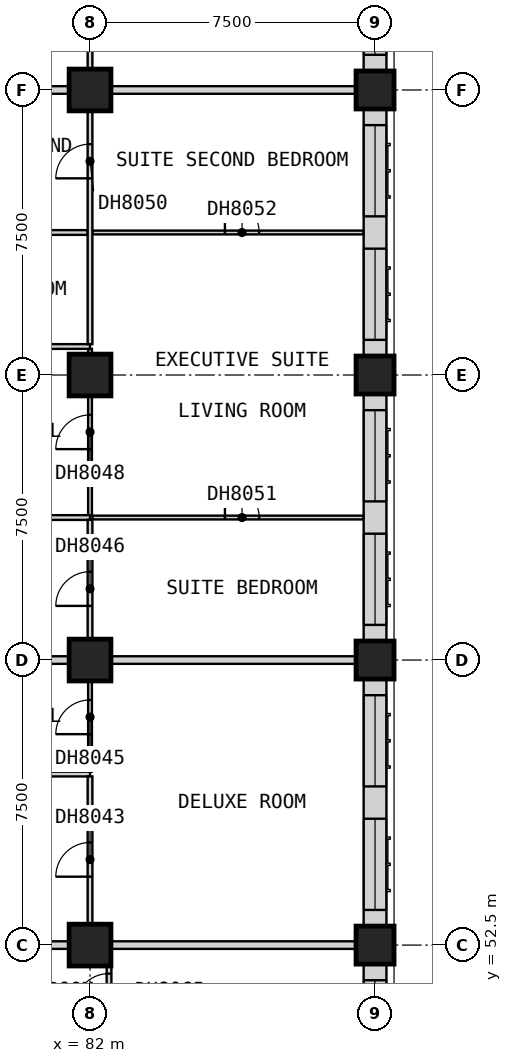
"""IFC4 building model, lengths in metres.
Left out: names, types, materials, properties, quantities, classifications, styles, units other than length and angle.
Written with IfcOpenShell. Run it as: python <this file> out.ifc"""

import sys

from ifc_helpers import new_model, si_unit, direction, frame, frame_2d, origin, origin_2d, place, context, subcontext, project, spatial, rectangle, extrude, element, fill, save


model = new_model("IFC4")
c1 = context("Model", 3, precision=1e-05, world=origin(), true_north=direction((0.0, 1.0)))
c2 = subcontext(c1, "Body", "Model", "MODEL_VIEW")
j1 = project(units=[si_unit("LENGTHUNIT", "METRE"), si_unit("PLANEANGLEUNIT", "RADIAN")], contexts=[c1])
p1 = place(None, origin())
s1 = spatial("IfcSite", under=j1, at=p1, CompositionType="ELEMENT")
p2 = place(p1, origin())
s2 = spatial("IfcBuilding", under=s1, at=p2, CompositionType="ELEMENT")
p3 = place(p2, frame((0.0, 0.0, 89.9)))
s3 = spatial("IfcBuildingStorey", under=s2, at=p3, CompositionType="ELEMENT", Elevation=89.9)
for number, where, z_axis, x_axis in (
    (1, (82.0, 52.5, 0.0), (0.0, 0.0, 1.0), (1.0, 0.0, 0.0)),
    (2, (82.0, 60.0, 0.0), (0.0, 0.0, 1.0), (1.0, 0.0, 0.0)),
    (3, (82.0, 67.5, 0.0), (0.0, 0.0, 1.0), (1.0, 0.0, 0.0)),
    (4, (82.0, 75.0, 0.0), (0.0, 0.0, 1.0), (1.0, 0.0, 0.0)),
):
    element("IfcColumn", number, at=place(p3, frame(where, z_axis=z_axis, x_axis=x_axis)), inside=s3, PredefinedType="COLUMN", context=c2, shape_type="SweptSolid", body=[
        extrude(rectangle(XDim=1.1, YDim=1.1, at=origin_2d()), origin(), (0.0, 0.0, 1.0), 3.6),
    ])
for number, where, z_axis, x_axis in (
    (5, (89.5, 52.5, 0.0), (0.0, 0.0, 1.0), (1.0, 0.0, 0.0)),
    (6, (89.5, 60.0, 0.0), (0.0, 0.0, 1.0), (1.0, 0.0, 0.0)),
    (7, (89.5, 67.5, 0.0), (0.0, 0.0, 1.0), (1.0, 0.0, 0.0)),
    (8, (89.5, 75.0, 0.0), (0.0, 0.0, 1.0), (1.0, 0.0, 0.0)),
):
    element("IfcColumn", number, at=place(p3, frame(where, z_axis=z_axis, x_axis=x_axis)), inside=s3, PredefinedType="COLUMN", context=c2, shape_type="SweptSolid", body=[
        extrude(rectangle(XDim=1.0, YDim=1.0, at=origin_2d()), origin(), (0.0, 0.0, 1.0), 3.6),
    ])
p4 = place(p3, frame((89.5, 46.0, 0.0), z_axis=(0.0, 0.0, 1.0), x_axis=(0.0, 1.0, 0.0)))
e9 = element("IfcWall", 9, at=p4, inside=s3, PredefinedType="SOLIDWALL", context=c2, shape_type="SweptSolid", body=[
    extrude(rectangle(XDim=6.0, YDim=0.6, at=frame_2d((3.0, 0.0))), origin(), (0.0, 0.0, 1.0), 2.85),
])
p5 = place(p4, frame((0.175, 0.0, 0.8)))
e10 = element("IfcOpeningElement", 10, at=p5, cuts=e9, PredefinedType="OPENING", context=c2, shape_type="SweptSolid", body=[
    extrude(rectangle(XDim=2.4, YDim=1.8, at=frame_2d((1.2, 0.9))), frame((0.0, 0.31, 0.0), z_axis=(0.0, -1.0, 0.0), x_axis=(1.0, 0.0, 0.0)), (0.0, 0.0, 1.0), 0.62),
])
p6 = place(p4, frame((3.175, 0.0, 0.8)))
e11 = element("IfcOpeningElement", 11, at=p6, cuts=e9, PredefinedType="OPENING", context=c2, shape_type="SweptSolid", body=[
    extrude(rectangle(XDim=2.4, YDim=1.8, at=frame_2d((1.2, 0.9))), frame((0.0, 0.31, 0.0), z_axis=(0.0, -1.0, 0.0), x_axis=(1.0, 0.0, 0.0)), (0.0, 0.0, 1.0), 0.62),
])
p7 = place(p3, frame((89.5, 53.0, 0.0), z_axis=(0.0, 0.0, 1.0), x_axis=(0.0, 1.0, 0.0)))
e12 = element("IfcWall", 12, at=p7, inside=s3, PredefinedType="SOLIDWALL", context=c2, shape_type="SweptSolid", body=[
    extrude(rectangle(XDim=6.5, YDim=0.6, at=frame_2d((3.25, 0.0))), origin(), (0.0, 0.0, 1.0), 2.85),
])
p8 = place(p7, frame((0.425, 0.0, 0.8)))
e13 = element("IfcOpeningElement", 13, at=p8, cuts=e12, PredefinedType="OPENING", context=c2, shape_type="SweptSolid", body=[
    extrude(rectangle(XDim=2.4, YDim=1.8, at=frame_2d((1.2, 0.9))), frame((0.0, 0.31, 0.0), z_axis=(0.0, -1.0, 0.0), x_axis=(1.0, 0.0, 0.0)), (0.0, 0.0, 1.0), 0.62),
])
p9 = place(p7, frame((3.675, 0.0, 0.8)))
e14 = element("IfcOpeningElement", 14, at=p9, cuts=e12, PredefinedType="OPENING", context=c2, shape_type="SweptSolid", body=[
    extrude(rectangle(XDim=2.4, YDim=1.8, at=frame_2d((1.2, 0.9))), frame((0.0, 0.31, 0.0), z_axis=(0.0, -1.0, 0.0), x_axis=(1.0, 0.0, 0.0)), (0.0, 0.0, 1.0), 0.62),
])
p10 = place(p3, frame((89.5, 60.5, 0.0), z_axis=(0.0, 0.0, 1.0), x_axis=(0.0, 1.0, 0.0)))
e15 = element("IfcWall", 15, at=p10, inside=s3, PredefinedType="SOLIDWALL", context=c2, shape_type="SweptSolid", body=[
    extrude(rectangle(XDim=6.5, YDim=0.6, at=frame_2d((3.25, 0.0))), origin(), (0.0, 0.0, 1.0), 2.85),
])
p11 = place(p10, frame((0.425, 0.0, 0.8)))
e16 = element("IfcOpeningElement", 16, at=p11, cuts=e15, PredefinedType="OPENING", context=c2, shape_type="SweptSolid", body=[
    extrude(rectangle(XDim=2.4, YDim=1.8, at=frame_2d((1.2, 0.9))), frame((0.0, 0.31, 0.0), z_axis=(0.0, -1.0, 0.0), x_axis=(1.0, 0.0, 0.0)), (0.0, 0.0, 1.0), 0.62),
])
p12 = place(p10, frame((3.675, 0.0, 0.8)))
e17 = element("IfcOpeningElement", 17, at=p12, cuts=e15, PredefinedType="OPENING", context=c2, shape_type="SweptSolid", body=[
    extrude(rectangle(XDim=2.4, YDim=1.8, at=frame_2d((1.2, 0.9))), frame((0.0, 0.31, 0.0), z_axis=(0.0, -1.0, 0.0), x_axis=(1.0, 0.0, 0.0)), (0.0, 0.0, 1.0), 0.62),
])
p13 = place(p3, frame((89.5, 68.0, 0.0), z_axis=(0.0, 0.0, 1.0), x_axis=(0.0, 1.0, 0.0)))
e18 = element("IfcWall", 18, at=p13, inside=s3, PredefinedType="SOLIDWALL", context=c2, shape_type="SweptSolid", body=[
    extrude(rectangle(XDim=6.5, YDim=0.6, at=frame_2d((3.25, 0.0))), origin(), (0.0, 0.0, 1.0), 2.85),
])
p14 = place(p13, frame((0.425, 0.0, 0.8)))
e19 = element("IfcOpeningElement", 19, at=p14, cuts=e18, PredefinedType="OPENING", context=c2, shape_type="SweptSolid", body=[
    extrude(rectangle(XDim=2.4, YDim=1.8, at=frame_2d((1.2, 0.9))), frame((0.0, 0.31, 0.0), z_axis=(0.0, -1.0, 0.0), x_axis=(1.0, 0.0, 0.0)), (0.0, 0.0, 1.0), 0.62),
])
p15 = place(p13, frame((3.675, 0.0, 0.8)))
e20 = element("IfcOpeningElement", 20, at=p15, cuts=e18, PredefinedType="OPENING", context=c2, shape_type="SweptSolid", body=[
    extrude(rectangle(XDim=2.4, YDim=1.8, at=frame_2d((1.2, 0.9))), frame((0.0, 0.31, 0.0), z_axis=(0.0, -1.0, 0.0), x_axis=(1.0, 0.0, 0.0)), (0.0, 0.0, 1.0), 0.62),
])
p16 = place(p3, frame((89.5, 75.5, 0.0), z_axis=(0.0, 0.0, 1.0), x_axis=(0.0, 1.0, 0.0)))
e21 = element("IfcWall", 21, at=p16, inside=s3, PredefinedType="SOLIDWALL", context=c2, shape_type="SweptSolid", body=[
    extrude(rectangle(XDim=6.5, YDim=0.6, at=frame_2d((3.25, 0.0))), origin(), (0.0, 0.0, 1.0), 2.85),
])
p17 = place(p16, frame((0.425, 0.0, 0.8)))
e22 = element("IfcOpeningElement", 22, at=p17, cuts=e21, PredefinedType="OPENING", context=c2, shape_type="SweptSolid", body=[
    extrude(rectangle(XDim=2.4, YDim=1.8, at=frame_2d((1.2, 0.9))), frame((0.0, 0.31, 0.0), z_axis=(0.0, -1.0, 0.0), x_axis=(1.0, 0.0, 0.0)), (0.0, 0.0, 1.0), 0.62),
])
p18 = place(p16, frame((3.675, 0.0, 0.8)))
e23 = element("IfcOpeningElement", 23, at=p18, cuts=e21, PredefinedType="OPENING", context=c2, shape_type="SweptSolid", body=[
    extrude(rectangle(XDim=2.4, YDim=1.8, at=frame_2d((1.2, 0.9))), frame((0.0, 0.31, 0.0), z_axis=(0.0, -1.0, 0.0), x_axis=(1.0, 0.0, 0.0)), (0.0, 0.0, 1.0), 0.62),
])
for number, where, z_axis, x_axis in (
    (24, (77.475, 52.5, 0.0), (0.0, 0.0, 1.0), (1.0, 0.0, 0.0)),
    (25, (77.475, 60.0, 0.0), (0.0, 0.0, 1.0), (1.0, 0.0, 0.0)),
    (26, (77.475, 75.0, 0.0), (0.0, 0.0, 1.0), (1.0, 0.0, 0.0)),
):
    element("IfcWall", number, at=place(p3, frame(where, z_axis=z_axis, x_axis=x_axis)), inside=s3, PredefinedType="PARTITIONING", context=c2, shape_type="SweptSolid", body=[
        extrude(rectangle(XDim=12.525, YDim=0.2, at=frame_2d((6.262, 0.0))), origin(), (0.0, 0.0, 1.0), 3.35),
    ])
p19 = place(p3, frame((82.062, 63.75, 0.0), z_axis=(0.0, 0.0, 1.0), x_axis=(1.0, 0.0, 0.0)))
e27 = element("IfcWall", 27, at=p19, inside=s3, PredefinedType="PARTITIONING", context=c2, shape_type="SweptSolid", body=[
    extrude(rectangle(XDim=7.127, YDim=0.1, at=frame_2d((3.564, 0.0))), origin(), (0.0, 0.0, 1.0), 3.35),
])
p20 = place(p19, frame((3.488, 0.0, 0.0)))
e28 = element("IfcOpeningElement", 28, at=p20, cuts=e27, PredefinedType="OPENING", context=c2, shape_type="SweptSolid", body=[
    extrude(rectangle(XDim=0.9, YDim=2.1, at=frame_2d((0.45, 1.05))), frame((0.0, 0.06, 0.0), z_axis=(0.0, -1.0, 0.0), x_axis=(1.0, 0.0, 0.0)), (0.0, 0.0, 1.0), 0.12),
])
p21 = place(p3, frame((82.062, 71.25, 0.0), z_axis=(0.0, 0.0, 1.0), x_axis=(1.0, 0.0, 0.0)))
e29 = element("IfcWall", 29, at=p21, inside=s3, PredefinedType="PARTITIONING", context=c2, shape_type="SweptSolid", body=[
    extrude(rectangle(XDim=7.127, YDim=0.1, at=frame_2d((3.564, 0.0))), origin(), (0.0, 0.0, 1.0), 3.35),
])
p22 = place(p21, frame((3.488, 0.0, 0.0)))
e30 = element("IfcOpeningElement", 30, at=p22, cuts=e29, PredefinedType="OPENING", context=c2, shape_type="SweptSolid", body=[
    extrude(rectangle(XDim=0.9, YDim=2.1, at=frame_2d((0.45, 1.05))), frame((0.0, 0.06, 0.0), z_axis=(0.0, -1.0, 0.0), x_axis=(1.0, 0.0, 0.0)), (0.0, 0.0, 1.0), 0.12),
])
p23 = place(p3, frame((82.0, 57.062, 0.0), z_axis=(0.0, 0.0, 1.0), x_axis=(0.0, 1.0, 0.0)))
e31 = element("IfcWall", 31, at=p23, inside=s3, PredefinedType="PARTITIONING", context=c2, shape_type="SweptSolid", body=[
    extrude(rectangle(XDim=2.837, YDim=0.1, at=frame_2d((1.419, 0.0))), origin(), (0.0, 0.0, 1.0), 3.35),
])
p24 = place(p23, frame((0.988, 0.0, 0.0)))
e32 = element("IfcOpeningElement", 32, at=p24, cuts=e31, PredefinedType="OPENING", context=c2, shape_type="SweptSolid", body=[
    extrude(rectangle(XDim=0.9, YDim=2.1, at=frame_2d((0.45, 1.05))), frame((0.0, 0.06, 0.0), z_axis=(0.0, -1.0, 0.0), x_axis=(1.0, 0.0, 0.0)), (0.0, 0.0, 1.0), 0.12),
])
p25 = place(p3, frame((82.0, 63.812, 0.0), z_axis=(0.0, 0.0, 1.0), x_axis=(0.0, 1.0, 0.0)))
e33 = element("IfcWall", 33, at=p25, inside=s3, PredefinedType="PARTITIONING", context=c2, shape_type="SweptSolid", body=[
    extrude(rectangle(XDim=4.375, YDim=0.1, at=frame_2d((2.188, 0.0))), origin(), (0.0, 0.0, 1.0), 3.35),
])
p26 = place(p25, frame((1.738, 0.0, 0.0)))
e34 = element("IfcOpeningElement", 34, at=p26, cuts=e33, PredefinedType="OPENING", context=c2, shape_type="SweptSolid", body=[
    extrude(rectangle(XDim=0.9, YDim=2.1, at=frame_2d((0.45, 1.05))), frame((0.0, 0.06, 0.0), z_axis=(0.0, -1.0, 0.0), x_axis=(1.0, 0.0, 0.0)), (0.0, 0.0, 1.0), 0.12),
])
for number, where, z_axis, x_axis in (
    (35, (77.475, 57.0, 0.0), (0.0, 0.0, 1.0), (1.0, 0.0, 0.0)),
    (36, (77.475, 63.75, 0.0), (0.0, 0.0, 1.0), (1.0, 0.0, 0.0)),
):
    element("IfcWall", number, at=place(p3, frame(where, z_axis=z_axis, x_axis=x_axis)), inside=s3, PredefinedType="PARTITIONING", context=c2, shape_type="SweptSolid", body=[
        extrude(rectangle(XDim=4.525, YDim=0.125, at=frame_2d((2.262, 0.0))), origin(), (0.0, 0.0, 1.0), 3.35),
    ])
p27 = place(p3, frame((77.475, 68.25, 0.0), z_axis=(0.0, 0.0, 1.0), x_axis=(1.0, 0.0, 0.0)))
e37 = element("IfcWall", 37, at=p27, inside=s3, PredefinedType="PARTITIONING", context=c2, shape_type="SweptSolid", body=[
    extrude(rectangle(XDim=4.525, YDim=0.125, at=frame_2d((2.262, 0.0))), origin(), (0.0, 0.0, 1.0), 3.35),
])
p28 = place(p27, frame((1.775, 0.0, 0.0)))
e38 = element("IfcOpeningElement", 38, at=p28, cuts=e37, PredefinedType="OPENING", context=c2, shape_type="SweptSolid", body=[
    extrude(rectangle(XDim=0.9, YDim=2.1, at=frame_2d((0.45, 1.05))), frame((0.0, 0.073, 0.0), z_axis=(0.0, -1.0, 0.0), x_axis=(1.0, 0.0, 0.0)), (0.0, 0.0, 1.0), 0.145),
])
p29 = place(p3, frame((77.475, 71.25, 0.0), z_axis=(0.0, 0.0, 1.0), x_axis=(1.0, 0.0, 0.0)))
e39 = element("IfcWall", 39, at=p29, inside=s3, PredefinedType="PARTITIONING", context=c2, shape_type="SweptSolid", body=[
    extrude(rectangle(XDim=4.462, YDim=0.125, at=frame_2d((2.231, 0.0))), origin(), (0.0, 0.0, 1.0), 3.35),
])
p30 = place(p3, frame((82.0, 52.6, 0.0), z_axis=(0.0, 0.0, 1.0), x_axis=(0.0, 1.0, 0.0)))
e40 = element("IfcWall", 40, at=p30, inside=s3, PredefinedType="PARTITIONING", context=c2, shape_type="SweptSolid", body=[
    extrude(rectangle(XDim=4.337, YDim=0.125, at=frame_2d((2.169, 0.0))), origin(), (0.0, 0.0, 1.0), 3.35),
])
p31 = place(p30, frame((1.7, 0.0, 0.0)))
e41 = element("IfcOpeningElement", 41, at=p31, cuts=e40, PredefinedType="OPENING", context=c2, shape_type="SweptSolid", body=[
    extrude(rectangle(XDim=0.9, YDim=2.1, at=frame_2d((0.45, 1.05))), frame((0.0, 0.073, 0.0), z_axis=(0.0, -1.0, 0.0), x_axis=(1.0, 0.0, 0.0)), (0.0, 0.0, 1.0), 0.145),
])
p32 = place(p3, frame((82.0, 60.1, 0.0), z_axis=(0.0, 0.0, 1.0), x_axis=(0.0, 1.0, 0.0)))
e42 = element("IfcWall", 42, at=p32, inside=s3, PredefinedType="PARTITIONING", context=c2, shape_type="SweptSolid", body=[
    extrude(rectangle(XDim=3.587, YDim=0.125, at=frame_2d((1.794, 0.0))), origin(), (0.0, 0.0, 1.0), 3.35),
])
p33 = place(p32, frame((1.325, 0.0, 0.0)))
e43 = element("IfcOpeningElement", 43, at=p33, cuts=e42, PredefinedType="OPENING", context=c2, shape_type="SweptSolid", body=[
    extrude(rectangle(XDim=0.9, YDim=2.1, at=frame_2d((0.45, 1.05))), frame((0.0, 0.073, 0.0), z_axis=(0.0, -1.0, 0.0), x_axis=(1.0, 0.0, 0.0)), (0.0, 0.0, 1.0), 0.145),
])
p34 = place(p3, frame((82.0, 68.312, 0.0), z_axis=(0.0, 0.0, 1.0), x_axis=(0.0, 1.0, 0.0)))
e44 = element("IfcWall", 44, at=p34, inside=s3, PredefinedType="PARTITIONING", context=c2, shape_type="SweptSolid", body=[
    extrude(rectangle(XDim=10.375, YDim=0.125, at=frame_2d((5.188, 0.0))), origin(), (0.0, 0.0, 1.0), 3.35),
])
p35 = place(p34, frame((4.363, 0.0, 0.0)))
e45 = element("IfcOpeningElement", 45, at=p35, cuts=e44, PredefinedType="OPENING", context=c2, shape_type="SweptSolid", body=[
    extrude(rectangle(XDim=0.9, YDim=2.1, at=frame_2d((0.45, 1.05))), frame((0.0, 0.073, 0.0), z_axis=(0.0, -1.0, 0.0), x_axis=(1.0, 0.0, 0.0)), (0.0, 0.0, 1.0), 0.145),
])
p36 = place(p34, frame((8.113, 0.0, 0.0)))
e46 = element("IfcOpeningElement", 46, at=p36, cuts=e44, PredefinedType="OPENING", context=c2, shape_type="SweptSolid", body=[
    extrude(rectangle(XDim=0.9, YDim=2.1, at=frame_2d((0.45, 1.05))), frame((0.0, 0.073, 0.0), z_axis=(0.0, -1.0, 0.0), x_axis=(1.0, 0.0, 0.0)), (0.0, 0.0, 1.0), 0.145),
])
p37 = place(p3, frame((82.5, 50.163, 0.0), z_axis=(0.0, 0.0, 1.0), x_axis=(0.0, 1.0, 0.0)))
e47 = element("IfcWall", 47, at=p37, inside=s3, PredefinedType="PARTITIONING", context=c2, shape_type="SweptSolid", body=[
    extrude(rectangle(XDim=2.237, YDim=0.125, at=frame_2d((1.119, 0.0))), origin(), (0.0, 0.0, 1.0), 3.35),
])
p38 = place(p37, frame((0.688, 0.0, 0.0)))
e48 = element("IfcOpeningElement", 48, at=p38, cuts=e47, PredefinedType="OPENING", context=c2, shape_type="SweptSolid", body=[
    extrude(rectangle(XDim=0.9, YDim=2.1, at=frame_2d((0.45, 1.05))), frame((0.0, 0.073, 0.0), z_axis=(0.0, -1.0, 0.0), x_axis=(1.0, 0.0, 0.0)), (0.0, 0.0, 1.0), 0.145),
])
p39 = place(p6, origin())
e49 = element("IfcWindow", 49, at=p39, inside=s3, PartitioningType="SINGLE_PANEL", PredefinedType="WINDOW", context=c2, shape_type="SweptSolid", body=[
    extrude(rectangle(XDim=2.4, YDim=1.8, at=frame_2d((1.2, 0.9))), frame((0.0, -0.07, 0.0), z_axis=(0.0, -1.0, 0.0), x_axis=(1.0, 0.0, 0.0)), (0.0, 0.0, 1.0), 0.06),
])
fill(e11, e49)
p40 = place(p8, origin())
e50 = element("IfcWindow", 50, at=p40, inside=s3, PartitioningType="SINGLE_PANEL", PredefinedType="WINDOW", context=c2, shape_type="SweptSolid", body=[
    extrude(rectangle(XDim=2.4, YDim=1.8, at=frame_2d((1.2, 0.9))), frame((0.0, -0.07, 0.0), z_axis=(0.0, -1.0, 0.0), x_axis=(1.0, 0.0, 0.0)), (0.0, 0.0, 1.0), 0.06),
])
fill(e13, e50)
p41 = place(p9, origin())
e51 = element("IfcWindow", 51, at=p41, inside=s3, PartitioningType="SINGLE_PANEL", PredefinedType="WINDOW", context=c2, shape_type="SweptSolid", body=[
    extrude(rectangle(XDim=2.4, YDim=1.8, at=frame_2d((1.2, 0.9))), frame((0.0, -0.07, 0.0), z_axis=(0.0, -1.0, 0.0), x_axis=(1.0, 0.0, 0.0)), (0.0, 0.0, 1.0), 0.06),
])
fill(e14, e51)
p42 = place(p11, origin())
e52 = element("IfcWindow", 52, at=p42, inside=s3, PartitioningType="SINGLE_PANEL", PredefinedType="WINDOW", context=c2, shape_type="SweptSolid", body=[
    extrude(rectangle(XDim=2.4, YDim=1.8, at=frame_2d((1.2, 0.9))), frame((0.0, -0.07, 0.0), z_axis=(0.0, -1.0, 0.0), x_axis=(1.0, 0.0, 0.0)), (0.0, 0.0, 1.0), 0.06),
])
fill(e16, e52)
p43 = place(p12, origin())
e53 = element("IfcWindow", 53, at=p43, inside=s3, PartitioningType="SINGLE_PANEL", PredefinedType="WINDOW", context=c2, shape_type="SweptSolid", body=[
    extrude(rectangle(XDim=2.4, YDim=1.8, at=frame_2d((1.2, 0.9))), frame((0.0, -0.07, 0.0), z_axis=(0.0, -1.0, 0.0), x_axis=(1.0, 0.0, 0.0)), (0.0, 0.0, 1.0), 0.06),
])
fill(e17, e53)
p44 = place(p14, origin())
e54 = element("IfcWindow", 54, at=p44, inside=s3, PartitioningType="SINGLE_PANEL", PredefinedType="WINDOW", context=c2, shape_type="SweptSolid", body=[
    extrude(rectangle(XDim=2.4, YDim=1.8, at=frame_2d((1.2, 0.9))), frame((0.0, -0.07, 0.0), z_axis=(0.0, -1.0, 0.0), x_axis=(1.0, 0.0, 0.0)), (0.0, 0.0, 1.0), 0.06),
])
fill(e19, e54)
p45 = place(p15, origin())
e55 = element("IfcWindow", 55, at=p45, inside=s3, PartitioningType="SINGLE_PANEL", PredefinedType="WINDOW", context=c2, shape_type="SweptSolid", body=[
    extrude(rectangle(XDim=2.4, YDim=1.8, at=frame_2d((1.2, 0.9))), frame((0.0, -0.07, 0.0), z_axis=(0.0, -1.0, 0.0), x_axis=(1.0, 0.0, 0.0)), (0.0, 0.0, 1.0), 0.06),
])
fill(e20, e55)
p46 = place(p17, origin())
e56 = element("IfcWindow", 56, at=p46, inside=s3, PartitioningType="SINGLE_PANEL", PredefinedType="WINDOW", context=c2, shape_type="SweptSolid", body=[
    extrude(rectangle(XDim=2.4, YDim=1.8, at=frame_2d((1.2, 0.9))), frame((0.0, -0.07, 0.0), z_axis=(0.0, -1.0, 0.0), x_axis=(1.0, 0.0, 0.0)), (0.0, 0.0, 1.0), 0.06),
])
fill(e22, e56)
p47 = place(p31, origin())
e57 = element("IfcDoor", 57, at=p47, inside=s3, OperationType="SINGLE_SWING_LEFT", PredefinedType="DOOR", context=c2, shape_type="SweptSolid", body=[
    extrude(rectangle(XDim=0.9, YDim=2.1, at=frame_2d((0.45, 1.05))), frame((0.0, 0.025, 0.0), z_axis=(0.0, -1.0, 0.0), x_axis=(1.0, 0.0, 0.0)), (0.0, 0.0, 1.0), 0.05),
])
fill(e41, e57)
p48 = place(p24, origin())
e58 = element("IfcDoor", 58, at=p48, inside=s3, OperationType="SINGLE_SWING_LEFT", PredefinedType="DOOR", context=c2, shape_type="SweptSolid", body=[
    extrude(rectangle(XDim=0.9, YDim=2.1, at=frame_2d((0.45, 1.05))), frame((0.0, 0.025, 0.0), z_axis=(0.0, -1.0, 0.0), x_axis=(1.0, 0.0, 0.0)), (0.0, 0.0, 1.0), 0.05),
])
fill(e32, e58)
p49 = place(p33, origin())
e59 = element("IfcDoor", 59, at=p49, inside=s3, OperationType="SINGLE_SWING_LEFT", PredefinedType="DOOR", context=c2, shape_type="SweptSolid", body=[
    extrude(rectangle(XDim=0.9, YDim=2.1, at=frame_2d((0.45, 1.05))), frame((0.0, 0.025, 0.0), z_axis=(0.0, -1.0, 0.0), x_axis=(1.0, 0.0, 0.0)), (0.0, 0.0, 1.0), 0.05),
])
fill(e43, e59)
p50 = place(p26, origin())
e60 = element("IfcDoor", 60, at=p50, inside=s3, OperationType="SINGLE_SWING_LEFT", PredefinedType="DOOR", context=c2, shape_type="SweptSolid", body=[
    extrude(rectangle(XDim=0.9, YDim=2.1, at=frame_2d((0.45, 1.05))), frame((0.0, 0.025, 0.0), z_axis=(0.0, -1.0, 0.0), x_axis=(1.0, 0.0, 0.0)), (0.0, 0.0, 1.0), 0.05),
])
fill(e34, e60)
p51 = place(p35, origin())
e61 = element("IfcDoor", 61, at=p51, inside=s3, OperationType="SINGLE_SWING_LEFT", PredefinedType="DOOR", context=c2, shape_type="SweptSolid", body=[
    extrude(rectangle(XDim=0.9, YDim=2.1, at=frame_2d((0.45, 1.05))), frame((0.0, 0.025, 0.0), z_axis=(0.0, -1.0, 0.0), x_axis=(1.0, 0.0, 0.0)), (0.0, 0.0, 1.0), 0.05),
])
fill(e45, e61)
p52 = place(p20, origin())
e62 = element("IfcDoor", 62, at=p52, inside=s3, OperationType="SINGLE_SWING_RIGHT", PredefinedType="DOOR", context=c2, shape_type="SweptSolid", body=[
    extrude(rectangle(XDim=0.9, YDim=2.1, at=frame_2d((0.45, 1.05))), frame((0.0, 0.025, 0.0), z_axis=(0.0, -1.0, 0.0), x_axis=(1.0, 0.0, 0.0)), (0.0, 0.0, 1.0), 0.05),
])
fill(e28, e62)
p53 = place(p22, origin())
e63 = element("IfcDoor", 63, at=p53, inside=s3, OperationType="SINGLE_SWING_RIGHT", PredefinedType="DOOR", context=c2, shape_type="SweptSolid", body=[
    extrude(rectangle(XDim=0.9, YDim=2.1, at=frame_2d((0.45, 1.05))), frame((0.0, 0.025, 0.0), z_axis=(0.0, -1.0, 0.0), x_axis=(1.0, 0.0, 0.0)), (0.0, 0.0, 1.0), 0.05),
])
fill(e30, e63)
p54 = place(p38, origin())
e64 = element("IfcDoor", 64, at=p54, inside=s3, OperationType="SINGLE_SWING_LEFT", PredefinedType="DOOR", context=c2, shape_type="SweptSolid", body=[
    extrude(rectangle(XDim=0.9, YDim=2.1, at=frame_2d((0.45, 1.05))), frame((0.0, 0.025, 0.0), z_axis=(0.0, -1.0, 0.0), x_axis=(1.0, 0.0, 0.0)), (0.0, 0.0, 1.0), 0.05),
])
fill(e48, e64)
save(model, sys.argv[1])
